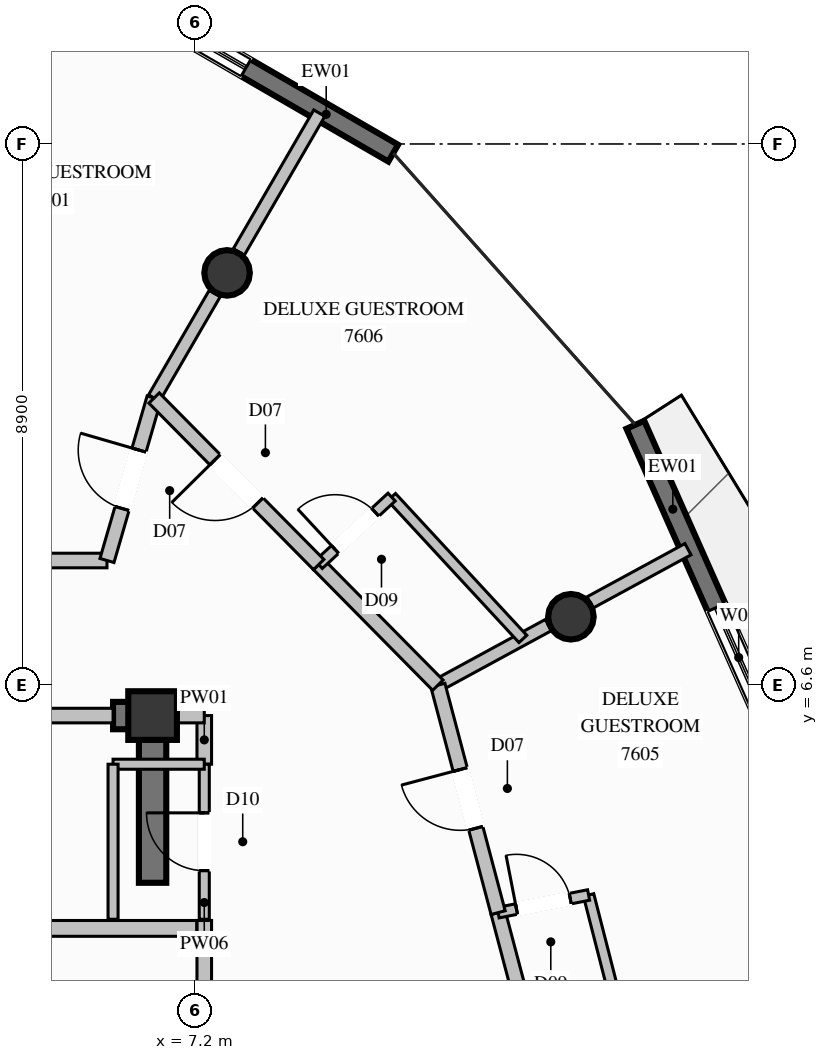
"""IFC4 building model, lengths in metres.
Left out: names, types, materials, properties, quantities, classifications, styles, units other than length and angle.
Written with IfcOpenShell. Run it as: python <this file> out.ifc"""

import sys

from ifc_helpers import new_model, si_unit, direction, frame, frame_2d, origin, origin_2d, place, context, subcontext, project, spatial, rectangle, circle, extrude, element, fill, save


model = new_model("IFC4")
c1 = context("Model", 3, precision=1e-05, world=origin(), true_north=direction((0.0, 1.0)))
c2 = subcontext(c1, "Body", "Model", "MODEL_VIEW")
j1 = project(units=[si_unit("LENGTHUNIT", "METRE"), si_unit("PLANEANGLEUNIT", "RADIAN")], contexts=[c1])
p1 = place(None, origin())
s1 = spatial("IfcSite", under=j1, at=p1, CompositionType="ELEMENT")
p2 = place(p1, origin())
s2 = spatial("IfcBuilding", under=s1, at=p2, CompositionType="ELEMENT")
p3 = place(p2, frame((0.0, 0.0, 285.8)))
s3 = spatial("IfcBuildingStorey", under=s2, at=p3, CompositionType="ELEMENT", Elevation=285.8)
p4 = place(p3, frame((6.5, 6.1, 0.0), z_axis=(0.0, 0.0, 1.0), x_axis=(1.0, 0.0, 0.0)))
e1 = element("IfcColumn", 1, at=p4, inside=s3, PredefinedType="COLUMN", context=c2, shape_type="SweptSolid", body=[
    extrude(rectangle(XDim=0.8, YDim=0.8, at=origin_2d()), origin(), (0.0, 0.0, 1.0), 3.8),
])
p5 = place(p3, frame((5.85, 6.1, 0.0), z_axis=(0.0, 0.0, 1.0), x_axis=(1.0, 0.0, 0.0)))
e2 = element("IfcWall", 2, at=p5, inside=s3, PredefinedType="SHEAR", context=c2, shape_type="SweptSolid", body=[
    extrude(rectangle(XDim=0.425, YDim=0.45, at=frame_2d((0.212, 0.0))), origin(), (0.0, 0.0, 1.0), 3.8),
])
p6 = place(p3, frame((6.5, 3.35, 0.0), z_axis=(0.0, 0.0, 1.0), x_axis=(0.0, 1.0, 0.0)))
e3 = element("IfcWall", 3, at=p6, inside=s3, PredefinedType="SHEAR", context=c2, shape_type="SweptSolid", body=[
    extrude(rectangle(XDim=2.975, YDim=0.45, at=frame_2d((1.487, 0.0))), origin(), (0.0, 0.0, 1.0), 3.8),
])
for number, where, z_axis, x_axis in (
    (4, (13.38, 7.725, 0.0), (0.0, 0.0, 1.0), (1.0, 0.0, 0.0)),
    (5, (7.725, 13.38, 0.0), (0.0, 0.0, 1.0), (1.0, 0.0, 0.0)),
):
    element("IfcColumn", number, at=place(p3, frame(where, z_axis=z_axis, x_axis=x_axis)), inside=s3, PredefinedType="COLUMN", context=c2, shape_type="SweptSolid", body=[
        extrude(circle(Radius=0.375, at=origin_2d()), origin(), (0.0, 0.0, 1.0), 3.8),
    ])
p7 = place(p3, frame((14.44, 10.882, 0.0), z_axis=(0.0, 0.0, 1.0), x_axis=(0.405854076471, -0.913937891004, 0.0)))
e6 = element("IfcWall", 6, at=p7, inside=s3, PredefinedType="SOLIDWALL", context=c2, shape_type="SweptSolid", body=[
    extrude(rectangle(XDim=6.054, YDim=0.32, at=frame_2d((3.027, 0.0))), origin(), (0.0, 0.0, 1.0), 3.57),
])
p8 = place(p7, frame((3.287, 0.0, 0.35)))
e7 = element("IfcOpeningElement", 7, at=p8, cuts=e6, PredefinedType="OPENING", context=c2, shape_type="SweptSolid", body=[
    extrude(rectangle(XDim=1.8, YDim=2.6, at=frame_2d((0.9, 1.3))), frame((0.0, 0.17, 0.0), z_axis=(0.0, -1.0, 0.0), x_axis=(1.0, 0.0, 0.0)), (0.0, 0.0, 1.0), 0.34),
])
p9 = place(p3, frame((5.339, 18.314, 0.0), z_axis=(0.0, 0.0, 1.0), x_axis=(0.865333025006, -0.501197322253, 0.0)))
e8 = element("IfcWall", 8, at=p9, inside=s3, PredefinedType="SOLIDWALL", context=c2, shape_type="SweptSolid", body=[
    extrude(rectangle(XDim=5.916, YDim=0.32, at=frame_2d((2.958, 0.0))), origin(), (0.0, 0.0, 1.0), 3.57),
])
p10 = place(p9, frame((1.317, 0.0, 0.35)))
e9 = element("IfcOpeningElement", 9, at=p10, cuts=e8, PredefinedType="OPENING", context=c2, shape_type="SweptSolid", body=[
    extrude(rectangle(XDim=1.8, YDim=2.6, at=frame_2d((0.9, 1.3))), frame((0.0, 0.17, 0.0), z_axis=(0.0, -1.0, 0.0), x_axis=(1.0, 0.0, 0.0)), (0.0, 0.0, 1.0), 0.34),
])
p11 = place(p3, frame((7.35, -2.34, 0.0), z_axis=(0.0, 0.0, 1.0), x_axis=(0.0, 1.0, 0.0)))
e10 = element("IfcWall", 10, at=p11, inside=s3, PredefinedType="PARTITIONING", context=c2, shape_type="SweptSolid", body=[
    extrude(rectangle(XDim=5.07, YDim=0.24, at=frame_2d((2.535, 0.0))), origin(), (0.0, 0.0, 1.0), 2.655),
])
p12 = place(p11, frame((2.548, 0.0, 0.0)))
e11 = element("IfcOpeningElement", 11, at=p12, cuts=e10, PredefinedType="OPENING", context=c2, shape_type="SweptSolid", body=[
    extrude(rectangle(XDim=1.15, YDim=2.2, at=frame_2d((0.575, 1.1))), frame((0.0, 0.13, 0.0), z_axis=(0.0, -1.0, 0.0), x_axis=(1.0, 0.0, 0.0)), (0.0, 0.0, 1.0), 0.26),
])
p13 = place(p3, frame((4.13, 2.6, 0.0), z_axis=(0.0, 0.0, 1.0), x_axis=(1.0, 0.0, 0.0)))
e12 = element("IfcWall", 12, at=p13, inside=s3, PredefinedType="PARTITIONING", context=c2, shape_type="SweptSolid", body=[
    extrude(rectangle(XDim=3.095, YDim=0.26, at=frame_2d((1.548, 0.0))), origin(), (0.0, 0.0, 1.0), 3.57),
])
p14 = place(p3, frame((-5.75, 8.65, 0.0), z_axis=(0.0, 0.0, 1.0), x_axis=(1.0, 0.0, 0.0)))
e13 = element("IfcWall", 13, at=p14, inside=s3, PredefinedType="PARTITIONING", context=c2, shape_type="SweptSolid", body=[
    extrude(rectangle(XDim=11.5, YDim=0.24, at=frame_2d((5.75, 0.0))), origin(), (0.0, 0.0, 1.0), 3.57),
])
p15 = place(p3, frame((3.0, 6.1, 0.0), z_axis=(0.0, 0.0, 1.0), x_axis=(1.0, 0.0, 0.0)))
e14 = element("IfcWall", 14, at=p15, inside=s3, PredefinedType="PARTITIONING", context=c2, shape_type="SweptSolid", body=[
    extrude(rectangle(XDim=2.85, YDim=0.24, at=frame_2d((1.425, 0.0))), origin(), (0.0, 0.0, 1.0), 2.655),
])
p16 = place(p3, frame((7.35, 5.3, 0.0), z_axis=(0.0, 0.0, 1.0), x_axis=(0.0, 1.0, 0.0)))
e15 = element("IfcWall", 15, at=p16, inside=s3, PredefinedType="PARTITIONING", context=c2, shape_type="SweptSolid", body=[
    extrude(rectangle(XDim=0.8, YDim=0.24, at=frame_2d((0.4, 0.0))), origin(), (0.0, 0.0, 1.0), 2.655),
])
p17 = place(p3, frame((6.5, 6.1, 0.0), z_axis=(0.0, 0.0, 1.0), x_axis=(1.0, 0.0, 0.0)))
e16 = element("IfcWall", 16, at=p17, inside=s3, PredefinedType="PARTITIONING", context=c2, shape_type="SweptSolid", body=[
    extrude(rectangle(XDim=0.85, YDim=0.24, at=frame_2d((0.425, 0.0))), origin(), (0.0, 0.0, 1.0), 3.011),
])
p18 = place(p3, frame((7.35, 2.75, 0.0), z_axis=(0.0, 0.0, 1.0), x_axis=(0.0, 1.0, 0.0)))
e17 = element("IfcWall", 17, at=p18, inside=s3, PredefinedType="PARTITIONING", context=c2, shape_type="SweptSolid", body=[
    extrude(rectangle(XDim=2.55, YDim=0.165, at=frame_2d((1.275, 0.0))), origin(), (0.0, 0.0, 1.0), 3.57),
])
p19 = place(p18, frame((0.8, 0.0, 0.0)))
e18 = element("IfcOpeningElement", 18, at=p19, cuts=e17, PredefinedType="OPENING", context=c2, shape_type="SweptSolid", body=[
    extrude(rectangle(XDim=0.95, YDim=2.1, at=frame_2d((0.475, 1.05))), frame((0.0, 0.093, 0.0), z_axis=(0.0, -1.0, 0.0), x_axis=(1.0, 0.0, 0.0)), (0.0, 0.0, 1.0), 0.185),
])
p20 = place(p3, frame((7.35, 5.3, 0.0), z_axis=(0.0, 0.0, 1.0), x_axis=(-1.0, 0.0, 0.0)))
e19 = element("IfcWall", 19, at=p20, inside=s3, PredefinedType="PARTITIONING", context=c2, shape_type="SweptSolid", body=[
    extrude(rectangle(XDim=1.5, YDim=0.165, at=frame_2d((0.75, 0.0))), origin(), (0.0, 0.0, 1.0), 2.655),
])
p21 = place(p3, frame((5.85, 5.3, 0.0), z_axis=(0.0, 0.0, 1.0), x_axis=(0.0, -1.0, 0.0)))
e20 = element("IfcWall", 20, at=p21, inside=s3, PredefinedType="PARTITIONING", context=c2, shape_type="SweptSolid", body=[
    extrude(rectangle(XDim=2.55, YDim=0.165, at=frame_2d((1.275, 0.0))), origin(), (0.0, 0.0, 1.0), 2.655),
])
p22 = place(p3, frame((11.192, 6.6, 0.0), z_axis=(0.0, 0.0, 1.0), x_axis=(0.878580364195, 0.477594538967, 0.0)))
e21 = element("IfcWall", 21, at=p22, inside=s3, PredefinedType="PARTITIONING", context=c2, shape_type="SweptSolid", body=[
    extrude(rectangle(XDim=2.068, YDim=0.21, at=frame_2d((1.034, 0.0))), origin(), (0.0, 0.0, 1.0), 3.011),
])
p23 = place(p3, frame((13.696, 7.961, 0.0), z_axis=(0.0, 0.0, 1.0), x_axis=(0.87848586555, 0.477768337198, 0.0)))
e22 = element("IfcWall", 22, at=p23, inside=s3, PredefinedType="PARTITIONING", context=c2, shape_type="SweptSolid", body=[
    extrude(rectangle(XDim=1.832, YDim=0.21, at=frame_2d((0.916, 0.0))), origin(), (0.0, 0.0, 1.0), 3.57),
])
p24 = place(p3, frame((6.525, 11.322, 0.0), z_axis=(0.0, 0.0, 1.0), x_axis=(0.501738314133, 0.865019458817, 0.0)))
e23 = element("IfcWall", 23, at=p24, inside=s3, PredefinedType="PARTITIONING", context=c2, shape_type="SweptSolid", body=[
    extrude(rectangle(XDim=1.987, YDim=0.21, at=frame_2d((0.994, 0.0))), origin(), (0.0, 0.0, 1.0), 3.011),
])
p25 = place(p3, frame((7.918, 13.724, 0.0), z_axis=(0.0, 0.0, 1.0), x_axis=(0.501677940029, 0.865054474868, 0.0)))
e24 = element("IfcWall", 24, at=p25, inside=s3, PredefinedType="PARTITIONING", context=c2, shape_type="SweptSolid", body=[
    extrude(rectangle(XDim=2.639, YDim=0.21, at=frame_2d((1.32, 0.0))), origin(), (0.0, 0.0, 1.0), 3.57),
])
p26 = place(p3, frame((5.75, 8.65, 0.0), z_axis=(0.0, 0.0, 1.0), x_axis=(0.27852040308, 0.960430312448, 0.0)))
e25 = element("IfcWall", 25, at=p26, inside=s3, PredefinedType="PARTITIONING", context=c2, shape_type="SweptSolid", body=[
    extrude(rectangle(XDim=2.782, YDim=0.24, at=frame_2d((1.391, 0.0))), origin(), (0.0, 0.0, 1.0), 3.57),
])
p27 = place(p26, frame((0.891, 0.0, 0.0)))
e26 = element("IfcOpeningElement", 26, at=p27, cuts=e25, PredefinedType="OPENING", context=c2, shape_type="SweptSolid", body=[
    extrude(rectangle(XDim=1.0, YDim=2.2, at=frame_2d((0.5, 1.1))), frame((0.0, 0.13, 0.0), z_axis=(0.0, -1.0, 0.0), x_axis=(1.0, 0.0, 0.0)), (0.0, 0.0, 1.0), 0.26),
])
p28 = place(p3, frame((12.9, 0.15, 0.0), z_axis=(0.0, 0.0, 1.0), x_axis=(-0.255796771697, 0.966730578594, 0.0)))
e27 = element("IfcWall", 27, at=p28, inside=s3, PredefinedType="PARTITIONING", context=c2, shape_type="SweptSolid", body=[
    extrude(rectangle(XDim=2.802, YDim=0.24, at=frame_2d((1.401, 0.0))), origin(), (0.0, 0.0, 1.0), 3.57),
])
p29 = place(p3, frame((14.452, 0.099, 0.0), z_axis=(0.0, 0.0, 1.0), x_axis=(-0.248078682083, 0.968739886397, 0.0)))
e28 = element("IfcWall", 28, at=p29, inside=s3, PredefinedType="PLUMBINGWALL", context=c2, shape_type="SweptSolid", body=[
    extrude(rectangle(XDim=3.148, YDim=0.175, at=frame_2d((1.574, 0.0))), origin(), (0.0, 0.0, 1.0), 3.57),
])
p30 = place(p3, frame((12.183, 2.859, 0.0), z_axis=(0.0, 0.0, 1.0), x_axis=(0.981523067571, 0.191343847108, 0.0)))
e29 = element("IfcWall", 29, at=p30, inside=s3, PredefinedType="PLUMBINGWALL", context=c2, shape_type="SweptSolid", body=[
    extrude(rectangle(XDim=1.516, YDim=0.175, at=frame_2d((0.758, 0.0))), origin(), (0.0, 0.0, 1.0), 3.57),
])
p31 = place(p30, frame((0.308, 0.0, 0.0)))
e30 = element("IfcOpeningElement", 30, at=p31, cuts=e29, PredefinedType="OPENING", context=c2, shape_type="SweptSolid", body=[
    extrude(rectangle(XDim=0.9, YDim=2.1, at=frame_2d((0.45, 1.05))), frame((0.0, 0.098, 0.0), z_axis=(0.0, -1.0, 0.0), x_axis=(1.0, 0.0, 0.0)), (0.0, 0.0, 1.0), 0.195),
])
p32 = place(p3, frame((12.183, 2.859, 0.0), z_axis=(0.0, 0.0, 1.0), x_axis=(-0.256107548437, 0.966648293659, 0.0)))
e31 = element("IfcWall", 31, at=p32, inside=s3, PredefinedType="PARTITIONING", context=c2, shape_type="SweptSolid", body=[
    extrude(rectangle(XDim=3.87, YDim=0.24, at=frame_2d((1.935, 0.0))), origin(), (0.0, 0.0, 1.0), 3.57),
])
p33 = place(p32, frame((1.435, 0.0, 0.0)))
e32 = element("IfcOpeningElement", 32, at=p33, cuts=e31, PredefinedType="OPENING", context=c2, shape_type="SweptSolid", body=[
    extrude(rectangle(XDim=1.0, YDim=2.2, at=frame_2d((0.5, 1.1))), frame((0.0, 0.13, 0.0), z_axis=(0.0, -1.0, 0.0), x_axis=(1.0, 0.0, 0.0)), (0.0, 0.0, 1.0), 0.26),
])
p34 = place(p3, frame((11.192, 6.6, 0.0), z_axis=(0.0, 0.0, 1.0), x_axis=(-0.702979205765, 0.711210402245, 0.0)))
e33 = element("IfcWall", 33, at=p34, inside=s3, PredefinedType="PARTITIONING", context=c2, shape_type="SweptSolid", body=[
    extrude(rectangle(XDim=2.788, YDim=0.24, at=frame_2d((1.394, 0.0))), origin(), (0.0, 0.0, 1.0), 3.57),
])
p35 = place(p3, frame((12.59, 7.36, 0.0), z_axis=(0.0, 0.0, 1.0), x_axis=(-0.679236484788, 0.733919476327, 0.0)))
e34 = element("IfcWall", 34, at=p35, inside=s3, PredefinedType="PLUMBINGWALL", context=c2, shape_type="SweptSolid", body=[
    extrude(rectangle(XDim=3.179, YDim=0.175, at=frame_2d((1.589, 0.0))), origin(), (0.0, 0.0, 1.0), 3.57),
])
p36 = place(p3, frame((9.232, 8.583, 0.0), z_axis=(0.0, 0.0, 1.0), x_axis=(0.733777226426, 0.679390154461, 0.0)))
e35 = element("IfcWall", 35, at=p36, inside=s3, PredefinedType="PLUMBINGWALL", context=c2, shape_type="SweptSolid", body=[
    extrude(rectangle(XDim=1.634, YDim=0.175, at=frame_2d((0.817, 0.0))), origin(), (0.0, 0.0, 1.0), 3.57),
])
p37 = place(p36, frame((0.367, 0.0, 0.0)))
e36 = element("IfcOpeningElement", 36, at=p37, cuts=e35, PredefinedType="OPENING", context=c2, shape_type="SweptSolid", body=[
    extrude(rectangle(XDim=0.9, YDim=2.1, at=frame_2d((0.45, 1.05))), frame((0.0, 0.098, 0.0), z_axis=(0.0, -1.0, 0.0), x_axis=(1.0, 0.0, 0.0)), (0.0, 0.0, 1.0), 0.195),
])
p38 = place(p3, frame((9.232, 8.583, 0.0), z_axis=(0.0, 0.0, 1.0), x_axis=(-0.702942107486, 0.711247069254, 0.0)))
e37 = element("IfcWall", 37, at=p38, inside=s3, PredefinedType="PARTITIONING", context=c2, shape_type="SweptSolid", body=[
    extrude(rectangle(XDim=3.851, YDim=0.24, at=frame_2d((1.926, 0.0))), origin(), (0.0, 0.0, 1.0), 3.57),
])
p39 = place(p38, frame((1.425, 0.0, 0.0)))
e38 = element("IfcOpeningElement", 38, at=p39, cuts=e37, PredefinedType="OPENING", context=c2, shape_type="SweptSolid", body=[
    extrude(rectangle(XDim=1.0, YDim=2.2, at=frame_2d((0.5, 1.1))), frame((0.0, 0.13, 0.0), z_axis=(0.0, -1.0, 0.0), x_axis=(1.0, 0.0, 0.0)), (0.0, 0.0, 1.0), 0.26),
])
p40 = place(p8, origin())
e39 = element("IfcWindow", 39, at=p40, inside=s3, PartitioningType="SINGLE_PANEL", PredefinedType="WINDOW", context=c2, shape_type="SweptSolid", body=[
    extrude(rectangle(XDim=1.8, YDim=2.6, at=frame_2d((0.9, 1.3))), frame((0.0, 0.03, 0.0), z_axis=(0.0, -1.0, 0.0), x_axis=(1.0, 0.0, 0.0)), (0.0, 0.0, 1.0), 0.06),
])
fill(e7, e39)
p41 = place(p10, origin())
e40 = element("IfcWindow", 40, at=p41, inside=s3, PartitioningType="SINGLE_PANEL", PredefinedType="WINDOW", context=c2, shape_type="SweptSolid", body=[
    extrude(rectangle(XDim=1.8, YDim=2.6, at=frame_2d((0.9, 1.3))), frame((0.0, 0.03, 0.0), z_axis=(0.0, -1.0, 0.0), x_axis=(1.0, 0.0, 0.0)), (0.0, 0.0, 1.0), 0.06),
])
fill(e9, e40)
p42 = place(p19, origin())
e41 = element("IfcDoor", 41, at=p42, inside=s3, OperationType="SINGLE_SWING_RIGHT", PredefinedType="DOOR", context=c2, shape_type="SweptSolid", body=[
    extrude(rectangle(XDim=0.95, YDim=2.1, at=frame_2d((0.475, 1.05))), frame((0.0, 0.025, 0.0), z_axis=(0.0, -1.0, 0.0), x_axis=(1.0, 0.0, 0.0)), (0.0, 0.0, 1.0), 0.05),
])
fill(e18, e41)
p43 = place(p27, origin())
e42 = element("IfcDoor", 42, at=p43, inside=s3, OperationType="SINGLE_SWING_RIGHT", PredefinedType="DOOR", context=c2, shape_type="SweptSolid", body=[
    extrude(rectangle(XDim=1.0, YDim=2.2, at=frame_2d((0.5, 1.1))), frame((0.0, 0.025, 0.0), z_axis=(0.0, -1.0, 0.0), x_axis=(1.0, 0.0, 0.0)), (0.0, 0.0, 1.0), 0.05),
])
fill(e26, e42)
p44 = place(p31, origin())
e43 = element("IfcDoor", 43, at=p44, inside=s3, OperationType="SINGLE_SWING_LEFT", PredefinedType="DOOR", context=c2, shape_type="SweptSolid", body=[
    extrude(rectangle(XDim=0.9, YDim=2.1, at=frame_2d((0.45, 1.05))), frame((0.0, 0.025, 0.0), z_axis=(0.0, -1.0, 0.0), x_axis=(1.0, 0.0, 0.0)), (0.0, 0.0, 1.0), 0.05),
])
fill(e30, e43)
p45 = place(p33, origin())
e44 = element("IfcDoor", 44, at=p45, inside=s3, OperationType="SINGLE_SWING_RIGHT", PredefinedType="DOOR", context=c2, shape_type="SweptSolid", body=[
    extrude(rectangle(XDim=1.0, YDim=2.2, at=frame_2d((0.5, 1.1))), frame((0.0, 0.025, 0.0), z_axis=(0.0, -1.0, 0.0), x_axis=(1.0, 0.0, 0.0)), (0.0, 0.0, 1.0), 0.05),
])
fill(e32, e44)
p46 = place(p37, origin())
e45 = element("IfcDoor", 45, at=p46, inside=s3, OperationType="SINGLE_SWING_LEFT", PredefinedType="DOOR", context=c2, shape_type="SweptSolid", body=[
    extrude(rectangle(XDim=0.9, YDim=2.1, at=frame_2d((0.45, 1.05))), frame((0.0, 0.025, 0.0), z_axis=(0.0, -1.0, 0.0), x_axis=(1.0, 0.0, 0.0)), (0.0, 0.0, 1.0), 0.05),
])
fill(e36, e45)
p47 = place(p39, origin())
e46 = element("IfcDoor", 46, at=p47, inside=s3, OperationType="SINGLE_SWING_RIGHT", PredefinedType="DOOR", context=c2, shape_type="SweptSolid", body=[
    extrude(rectangle(XDim=1.0, YDim=2.2, at=frame_2d((0.5, 1.1))), frame((0.0, 0.025, 0.0), z_axis=(0.0, -1.0, 0.0), x_axis=(1.0, 0.0, 0.0)), (0.0, 0.0, 1.0), 0.05),
])
fill(e38, e46)
save(model, sys.argv[1])
